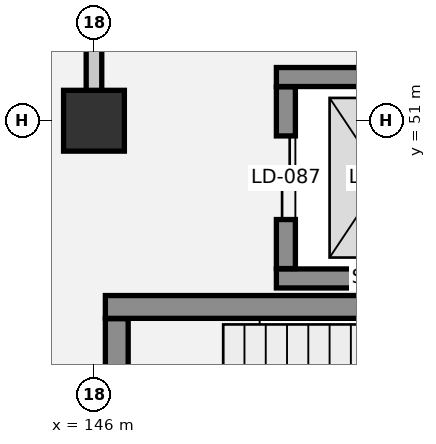
"""IFC4 building model, lengths in metres.
Left out: names, types, materials, properties, quantities, classifications, styles, units other than length and angle.
Written with IfcOpenShell. Run it as: python <this file> out.ifc"""

import sys

from ifc_helpers import new_model, si_unit, direction, frame, frame_2d, origin, origin_2d, place, context, subcontext, project, spatial, rectangle, extrude, element, fill, save


model = new_model("IFC4")
c1 = context("Model", 3, precision=1e-05, world=origin(), true_north=direction((0.0, 1.0)))
c2 = subcontext(c1, "Body", "Model", "MODEL_VIEW")
j1 = project(units=[si_unit("LENGTHUNIT", "METRE"), si_unit("PLANEANGLEUNIT", "RADIAN")], contexts=[c1])
p1 = place(None, origin())
s1 = spatial("IfcSite", under=j1, at=p1, CompositionType="ELEMENT")
p2 = place(p1, origin())
s2 = spatial("IfcBuilding", under=s1, at=p2, CompositionType="ELEMENT")
p3 = place(p2, origin())
s3 = spatial("IfcBuildingStorey", under=s2, at=p3, CompositionType="ELEMENT", Elevation=0.0)
p4 = place(p3, frame((146.0, 51.0, 0.0), z_axis=(0.0, 0.0, 1.0), x_axis=(1.0, 0.0, 0.0)))
e1 = element("IfcColumn", 1, at=p4, inside=s3, PredefinedType="COLUMN", context=c2, shape_type="SweptSolid", body=[
    extrude(rectangle(XDim=0.8, YDim=0.8, at=origin_2d()), origin(), (0.0, 0.0, 1.0), 5.4),
])
for number, where, z_axis, x_axis in (
    (2, (148.4, 48.925, 0.0), (0.0, 0.0, 1.0), (1.0, 0.0, 0.0)),
    (3, (151.2, 51.575, 0.0), (0.0, 0.0, 1.0), (-1.0, 0.0, 0.0)),
):
    element("IfcWall", number, at=place(p3, frame(where, z_axis=z_axis, x_axis=x_axis)), inside=s3, PredefinedType="SHEAR", context=c2, shape_type="SweptSolid", body=[
        extrude(rectangle(XDim=2.8, YDim=0.25, at=frame_2d((1.4, 0.0))), origin(), (0.0, 0.0, 1.0), 5.4),
    ])
p5 = place(p3, frame((148.525, 51.445, 0.0), z_axis=(0.0, 0.0, 1.0), x_axis=(0.0, -1.0, 0.0)))
e4 = element("IfcWall", 4, at=p5, inside=s3, PredefinedType="SHEAR", context=c2, shape_type="SweptSolid", body=[
    extrude(rectangle(XDim=2.39, YDim=0.25, at=frame_2d((1.195, 0.0))), origin(), (0.0, 0.0, 1.0), 5.4),
])
p6 = place(p5, frame((0.645, 0.0, 0.0)))
e5 = element("IfcOpeningElement", 5, at=p6, cuts=e4, PredefinedType="OPENING", context=c2, shape_type="SweptSolid", body=[
    extrude(rectangle(XDim=1.1, YDim=2.15, at=frame_2d((0.55, 1.075))), frame((0.0, 0.135, 0.0), z_axis=(0.0, -1.0, 0.0), x_axis=(1.0, 0.0, 0.0)), (0.0, 0.0, 1.0), 0.27),
])
p7 = place(p3, frame((153.85, 48.55, 0.0), z_axis=(0.0, 0.0, 1.0), x_axis=(-1.0, 0.0, 0.0)))
e6 = element("IfcWall", 6, at=p7, inside=s3, PredefinedType="SHEAR", context=c2, shape_type="SweptSolid", body=[
    extrude(rectangle(XDim=7.7, YDim=0.3, at=frame_2d((3.85, 0.0))), origin(), (0.0, 0.0, 1.0), 5.1),
])
p8 = place(p3, frame((146.3, 44.405, 0.0), z_axis=(0.0, 0.0, 1.0), x_axis=(0.0, 1.0, 0.0)))
e7 = element("IfcWall", 7, at=p8, inside=s3, PredefinedType="SHEAR", context=c2, shape_type="SweptSolid", body=[
    extrude(rectangle(XDim=3.99, YDim=0.3, at=frame_2d((1.995, 0.0))), origin(), (0.0, 0.0, 1.0), 5.1),
])
p9 = place(p8, frame((1.32, 0.0, 0.0)))
e8 = element("IfcOpeningElement", 8, at=p9, cuts=e7, PredefinedType="OPENING", context=c2, shape_type="SweptSolid", body=[
    extrude(rectangle(XDim=1.35, YDim=2.2, at=frame_2d((0.675, 1.1))), frame((0.0, 0.16, 0.0), z_axis=(0.0, -1.0, 0.0), x_axis=(1.0, 0.0, 0.0)), (0.0, 0.0, 1.0), 0.32),
])
p10 = place(p3, frame((146.0, 51.35, 0.0), z_axis=(0.0, 0.0, 1.0), x_axis=(0.0, 1.0, 0.0)))
e9 = element("IfcWall", 9, at=p10, inside=s3, PredefinedType="PARTITIONING", context=c2, shape_type="SweptSolid", body=[
    extrude(rectangle(XDim=12.17, YDim=0.205, at=frame_2d((6.085, 0.0))), origin(), (0.0, 0.0, 1.0), 4.15),
])
p11 = place(p6, origin())
e10 = element("IfcDoor", 10, at=p11, inside=s3, OperationType="DOUBLE_DOOR_SLIDING", PredefinedType="DOOR", context=c2, shape_type="SweptSolid", body=[
    extrude(rectangle(XDim=1.1, YDim=2.15, at=frame_2d((0.55, 1.075))), frame((0.0, 0.025, 0.0), z_axis=(0.0, -1.0, 0.0), x_axis=(1.0, 0.0, 0.0)), (0.0, 0.0, 1.0), 0.05),
])
fill(e5, e10)
save(model, sys.argv[1])
